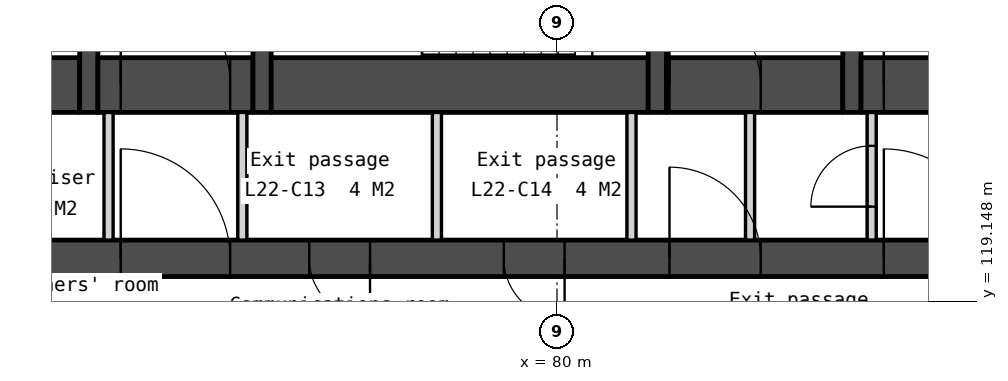
"""IFC4 building model, lengths in metres.
Left out: names, types, materials, properties, quantities, classifications, styles, units other than length and angle.
Written with IfcOpenShell. Run it as: python <this file> out.ifc"""

import sys

from ifc_helpers import new_model, si_unit, direction, frame, frame_2d, origin, place, context, subcontext, project, spatial, polyline, rectangle, outline, extrude, element, fill, save


model = new_model("IFC4")
c1 = context("Model", 3, precision=1e-05, world=origin(), true_north=direction((0.0, 1.0)))
c2 = subcontext(c1, "Body", "Model", "MODEL_VIEW")
j1 = project(units=[si_unit("LENGTHUNIT", "METRE"), si_unit("PLANEANGLEUNIT", "RADIAN")], contexts=[c1])
p1 = place(None, origin())
s1 = spatial("IfcSite", under=j1, at=p1, CompositionType="ELEMENT")
p2 = place(p1, origin())
s2 = spatial("IfcBuilding", under=s1, at=p2, CompositionType="ELEMENT")
p3 = place(p2, frame((0.0, 0.0, 92.3)))
s3 = spatial("IfcBuildingStorey", under=s2, at=p3, CompositionType="ELEMENT", Elevation=92.3)
p4 = place(p3, frame((66.0, 119.85, 0.0), z_axis=(0.0, 0.0, 1.0), x_axis=(1.0, 0.0, 0.0)))
e1 = element("IfcWall", 1, at=p4, inside=s3, PredefinedType="SOLIDWALL", context=c2, shape_type="SweptSolid", body=[
    extrude(rectangle(XDim=28.0, YDim=0.6, at=frame_2d((14.0, 0.0))), origin(), (0.0, 0.0, 1.0), 3.35),
])
p5 = place(p4, frame((6.825, 0.0, 0.0)))
e2 = element("IfcOpeningElement", 2, at=p5, cuts=e1, PredefinedType="OPENING", context=c2, shape_type="SweptSolid", body=[
    extrude(rectangle(XDim=1.8, YDim=2.1, at=frame_2d((0.9, 1.05))), frame((0.0, 0.31, 0.0), z_axis=(0.0, -1.0, 0.0), x_axis=(1.0, 0.0, 0.0)), (0.0, 0.0, 1.0), 0.62),
])
p6 = place(p4, frame((15.85, 0.0, 0.0)))
e3 = element("IfcOpeningElement", 3, at=p6, cuts=e1, PredefinedType="OPENING", context=c2, shape_type="SweptSolid", body=[
    extrude(rectangle(XDim=1.5, YDim=2.1, at=frame_2d((0.75, 1.05))), frame((0.0, 0.31, 0.0), z_axis=(0.0, -1.0, 0.0), x_axis=(1.0, 0.0, 0.0)), (0.0, 0.0, 1.0), 0.62),
])
p7 = place(p4, frame((19.375, 0.0, 0.0)))
e4 = element("IfcOpeningElement", 4, at=p7, cuts=e1, PredefinedType="OPENING", context=c2, shape_type="SweptSolid", body=[
    extrude(rectangle(XDim=1.8, YDim=2.1, at=frame_2d((0.9, 1.05))), frame((0.0, 0.31, 0.0), z_axis=(0.0, -1.0, 0.0), x_axis=(1.0, 0.0, 0.0)), (0.0, 0.0, 1.0), 0.62),
])
p8 = place(p4, frame((4.425, 0.0, 0.0)))
e5 = element("IfcOpeningElement", 5, at=p8, cuts=e1, PredefinedType="OPENING", context=c2, shape_type="SweptSolid", body=[
    extrude(rectangle(XDim=1.0, YDim=2.1, at=frame_2d((0.5, 1.05))), frame((0.0, 0.31, 0.0), z_axis=(0.0, -1.0, 0.0), x_axis=(1.0, 0.0, 0.0)), (0.0, 0.0, 1.0), 0.62),
])
p9 = place(p4, frame((9.925, 0.0, 0.0)))
e6 = element("IfcOpeningElement", 6, at=p9, cuts=e1, PredefinedType="OPENING", context=c2, shape_type="SweptSolid", body=[
    extrude(rectangle(XDim=1.0, YDim=2.1, at=frame_2d((0.5, 1.05))), frame((0.0, 0.31, 0.0), z_axis=(0.0, -1.0, 0.0), x_axis=(1.0, 0.0, 0.0)), (0.0, 0.0, 1.0), 0.62),
])
p10 = place(p4, frame((13.125, 0.0, 0.0)))
e7 = element("IfcOpeningElement", 7, at=p10, cuts=e1, PredefinedType="OPENING", context=c2, shape_type="SweptSolid", body=[
    extrude(rectangle(XDim=1.0, YDim=2.1, at=frame_2d((0.5, 1.05))), frame((0.0, 0.31, 0.0), z_axis=(0.0, -1.0, 0.0), x_axis=(1.0, 0.0, 0.0)), (0.0, 0.0, 1.0), 0.62),
])
p11 = place(p4, frame((21.725, 0.0, 0.0)))
e8 = element("IfcOpeningElement", 8, at=p11, cuts=e1, PredefinedType="OPENING", context=c2, shape_type="SweptSolid", body=[
    extrude(rectangle(XDim=1.0, YDim=2.1, at=frame_2d((0.5, 1.05))), frame((0.0, 0.31, 0.0), z_axis=(0.0, -1.0, 0.0), x_axis=(1.0, 0.0, 0.0)), (0.0, 0.0, 1.0), 0.62),
])
p12 = place(p4, frame((23.425, 0.0, 0.0)))
e9 = element("IfcOpeningElement", 9, at=p12, cuts=e1, PredefinedType="OPENING", context=c2, shape_type="SweptSolid", body=[
    extrude(rectangle(XDim=1.0, YDim=2.1, at=frame_2d((0.5, 1.05))), frame((0.0, 0.31, 0.0), z_axis=(0.0, -1.0, 0.0), x_axis=(1.0, 0.0, 0.0)), (0.0, 0.0, 1.0), 0.62),
])
p13 = place(p3, frame((69.6, 122.7, 0.0), z_axis=(0.0, 0.0, 1.0), x_axis=(1.0, 0.0, 0.0)))
e10 = element("IfcWall", 10, at=p13, inside=s3, PredefinedType="SOLIDWALL", context=c2, shape_type="SweptSolid", body=[
    extrude(rectangle(XDim=2.55, YDim=0.9, at=frame_2d((1.275, 0.0))), origin(), (0.0, 0.0, 1.0), 3.35),
])
p14 = place(p3, frame((72.3, 133.95, 0.0), z_axis=(0.0, 0.0, 1.0), x_axis=(0.0, -1.0, 0.0)))
e11 = element("IfcWall", 11, at=p14, inside=s3, PredefinedType="SOLIDWALL", context=c2, shape_type="SweptSolid", body=[
    extrude(rectangle(XDim=11.7, YDim=0.3, at=frame_2d((5.85, 0.0))), origin(), (0.0, 0.0, 1.0), 3.35),
])
p15 = place(p14, frame((6.95, 0.0, 0.0)))
e12 = element("IfcOpeningElement", 12, at=p15, cuts=e11, PredefinedType="OPENING", context=c2, shape_type="SweptSolid", body=[
    extrude(rectangle(XDim=1.1, YDim=2.1, at=frame_2d((0.55, 1.05))), frame((0.0, 0.16, 0.0), z_axis=(0.0, -1.0, 0.0), x_axis=(1.0, 0.0, 0.0)), (0.0, 0.0, 1.0), 0.32),
])
p16 = place(p14, frame((9.35, 0.0, 0.0)))
e13 = element("IfcOpeningElement", 13, at=p16, cuts=e11, PredefinedType="OPENING", context=c2, shape_type="SweptSolid", body=[
    extrude(rectangle(XDim=0.9, YDim=2.1, at=frame_2d((0.45, 1.05))), frame((0.0, 0.16, 0.0), z_axis=(0.0, -1.0, 0.0), x_axis=(1.0, 0.0, 0.0)), (0.0, 0.0, 1.0), 0.32),
])
p17 = place(p14, frame((5.1, 0.0, 0.0)))
e14 = element("IfcOpeningElement", 14, at=p17, cuts=e11, PredefinedType="OPENING", context=c2, shape_type="SweptSolid", body=[
    extrude(rectangle(XDim=1.0, YDim=2.1, at=frame_2d((0.5, 1.05))), frame((0.0, 0.16, 0.0), z_axis=(0.0, -1.0, 0.0), x_axis=(1.0, 0.0, 0.0)), (0.0, 0.0, 1.0), 0.32),
])
p18 = place(p3, frame((72.45, 122.7, 0.0), z_axis=(0.0, 0.0, 1.0), x_axis=(1.0, 0.0, 0.0)))
e15 = element("IfcWall", 15, at=p18, inside=s3, PredefinedType="SOLIDWALL", context=c2, shape_type="SweptSolid", body=[
    extrude(rectangle(XDim=2.55, YDim=0.9, at=frame_2d((1.275, 0.0))), origin(), (0.0, 0.0, 1.0), 3.35),
])
p19 = place(p18, frame((0.375, 0.0, 0.0)))
e16 = element("IfcOpeningElement", 16, at=p19, cuts=e15, PredefinedType="OPENING", context=c2, shape_type="SweptSolid", body=[
    extrude(rectangle(XDim=1.8, YDim=2.1, at=frame_2d((0.9, 1.05))), frame((0.0, 0.46, 0.0), z_axis=(0.0, -1.0, 0.0), x_axis=(1.0, 0.0, 0.0)), (0.0, 0.0, 1.0), 0.92),
])
for number, where, z_axis, x_axis in (
    (17, (72.625, 122.25, 0.0), (0.0, 0.0, 1.0), (0.0, -1.0, 0.0)),
    (18, (74.825, 122.25, 0.0), (0.0, 0.0, 1.0), (0.0, -1.0, 0.0)),
):
    element("IfcWall", number, at=place(p3, frame(where, z_axis=z_axis, x_axis=x_axis)), inside=s3, PredefinedType="PARTITIONING", context=c2, shape_type="SweptSolid", body=[
        extrude(rectangle(XDim=2.1, YDim=0.15, at=frame_2d((1.05, 0.0))), origin(), (0.0, 0.0, 1.0), 3.35),
    ])
p20 = place(p3, frame((75.15, 133.95, 0.0), z_axis=(0.0, 0.0, 1.0), x_axis=(0.0, -1.0, 0.0)))
e19 = element("IfcWall", 19, at=p20, inside=s3, PredefinedType="SOLIDWALL", context=c2, shape_type="SweptSolid", body=[
    extrude(rectangle(XDim=11.7, YDim=0.3, at=frame_2d((5.85, 0.0))), origin(), (0.0, 0.0, 1.0), 3.35),
])
p21 = place(p3, frame((75.3, 122.7, 0.0), z_axis=(0.0, 0.0, 1.0), x_axis=(1.0, 0.0, 0.0)))
e20 = element("IfcWall", 20, at=p21, inside=s3, PredefinedType="SOLIDWALL", context=c2, shape_type="SweptSolid", body=[
    extrude(rectangle(XDim=6.2, YDim=0.9, at=frame_2d((3.1, 0.0))), origin(), (0.0, 0.0, 1.0), 3.35),
])
for number, where, z_axis, x_axis in (
    (21, (78.025, 122.25, 0.0), (0.0, 0.0, 1.0), (0.0, -1.0, 0.0)),
    (22, (81.225, 122.25, 0.0), (0.0, 0.0, 1.0), (0.0, -1.0, 0.0)),
):
    element("IfcWall", number, at=place(p3, frame(where, z_axis=z_axis, x_axis=x_axis)), inside=s3, PredefinedType="PARTITIONING", context=c2, shape_type="SweptSolid", body=[
        extrude(rectangle(XDim=2.1, YDim=0.15, at=frame_2d((1.05, 0.0))), origin(), (0.0, 0.0, 1.0), 3.35),
    ])
p22 = place(p3, frame((81.65, 125.7, 0.0), z_axis=(0.0, 0.0, 1.0), x_axis=(0.0, -1.0, 0.0)))
e23 = element("IfcWall", 23, at=p22, inside=s3, PredefinedType="SOLIDWALL", context=c2, shape_type="SweptSolid", body=[
    extrude(rectangle(XDim=3.45, YDim=0.3, at=frame_2d((1.725, 0.0))), origin(), (0.0, 0.0, 1.0), 3.35),
])
p23 = place(p22, frame((0.75, 0.0, 0.0)))
e24 = element("IfcOpeningElement", 24, at=p23, cuts=e23, PredefinedType="OPENING", context=c2, shape_type="SweptSolid", body=[
    extrude(rectangle(XDim=1.0, YDim=2.1, at=frame_2d((0.5, 1.05))), frame((0.0, 0.16, 0.0), z_axis=(0.0, -1.0, 0.0), x_axis=(1.0, 0.0, 0.0)), (0.0, 0.0, 1.0), 0.32),
])
p24 = place(p3, frame((81.8, 122.7, 0.0), z_axis=(0.0, 0.0, 1.0), x_axis=(1.0, 0.0, 0.0)))
e25 = element("IfcWall", 25, at=p24, inside=s3, PredefinedType="SOLIDWALL", context=c2, shape_type="SweptSolid", body=[
    extrude(rectangle(XDim=2.9, YDim=0.9, at=frame_2d((1.45, 0.0))), origin(), (0.0, 0.0, 1.0), 3.35),
])
p25 = place(p24, frame((0.05, 0.0, 0.0)))
e26 = element("IfcOpeningElement", 26, at=p25, cuts=e25, PredefinedType="OPENING", context=c2, shape_type="SweptSolid", body=[
    extrude(rectangle(XDim=1.5, YDim=2.1, at=frame_2d((0.75, 1.05))), frame((0.0, 0.46, 0.0), z_axis=(0.0, -1.0, 0.0), x_axis=(1.0, 0.0, 0.0)), (0.0, 0.0, 1.0), 0.92),
])
p26 = place(p3, frame((83.175, 122.25, 0.0), z_axis=(0.0, 0.0, 1.0), x_axis=(0.0, -1.0, 0.0)))
e27 = element("IfcWall", 27, at=p26, inside=s3, PredefinedType="PARTITIONING", context=c2, shape_type="SweptSolid", body=[
    extrude(rectangle(XDim=2.1, YDim=0.15, at=frame_2d((1.05, 0.0))), origin(), (0.0, 0.0, 1.0), 3.35),
])
p27 = place(p3, frame((84.85, 133.95, 0.0), z_axis=(0.0, 0.0, 1.0), x_axis=(0.0, -1.0, 0.0)))
e28 = element("IfcWall", 28, at=p27, inside=s3, PredefinedType="SOLIDWALL", context=c2, shape_type="SweptSolid", body=[
    extrude(rectangle(XDim=11.7, YDim=0.3, at=frame_2d((5.85, 0.0))), origin(), (0.0, 0.0, 1.0), 3.35),
])
p28 = place(p3, frame((85.0, 122.7, 0.0), z_axis=(0.0, 0.0, 1.0), x_axis=(1.0, 0.0, 0.0)))
e29 = element("IfcWall", 29, at=p28, inside=s3, PredefinedType="SOLIDWALL", context=c2, shape_type="SweptSolid", body=[
    extrude(rectangle(XDim=2.55, YDim=0.9, at=frame_2d((1.275, 0.0))), origin(), (0.0, 0.0, 1.0), 3.35),
])
p29 = place(p28, frame((0.375, 0.0, 0.0)))
e30 = element("IfcOpeningElement", 30, at=p29, cuts=e29, PredefinedType="OPENING", context=c2, shape_type="SweptSolid", body=[
    extrude(rectangle(XDim=1.8, YDim=2.1, at=frame_2d((0.9, 1.05))), frame((0.0, 0.46, 0.0), z_axis=(0.0, -1.0, 0.0), x_axis=(1.0, 0.0, 0.0)), (0.0, 0.0, 1.0), 0.92),
])
p30 = place(p3, frame((85.175, 122.25, 0.0), z_axis=(0.0, 0.0, 1.0), x_axis=(0.0, -1.0, 0.0)))
e31 = element("IfcWall", 31, at=p30, inside=s3, PredefinedType="PARTITIONING", context=c2, shape_type="SweptSolid", body=[
    extrude(rectangle(XDim=2.1, YDim=0.15, at=frame_2d((1.05, 0.0))), origin(), (0.0, 0.0, 1.0), 3.35),
])
p31 = place(p30, frame((0.55, 0.0, 0.0)))
e32 = element("IfcOpeningElement", 32, at=p31, cuts=e31, PredefinedType="OPENING", context=c2, shape_type="SweptSolid", body=[
    extrude(rectangle(XDim=1.0, YDim=2.1, at=frame_2d((0.5, 1.05))), frame((0.0, 0.085, 0.0), z_axis=(0.0, -1.0, 0.0), x_axis=(1.0, 0.0, 0.0)), (0.0, 0.0, 1.0), 0.17),
])
p32 = place(p3, frame((56.073, 130.263, -0.15), z_axis=(0.0, 0.0, 1.0), x_axis=(0.500000478905, -0.866025127289, 0.0)))
e33 = element("IfcWall", 33, at=p32, inside=s3, PredefinedType="SOLIDWALL", context=c2, shape_type="SweptSolid", body=[
    extrude(outline(polyline([(42.643, 0.0), (42.643, 3.5), (0.0, 3.5), (0.0, 0.0), (42.643, 0.0)])), frame((0.0, 0.225, 0.0), z_axis=(0.0, -1.0, 0.0), x_axis=(1.0, 0.0, 0.0)), (0.0, 0.0, 1.0), 0.45),
])
p33 = place(p32, frame((2.814, 0.0, 1.05)))
e34 = element("IfcOpeningElement", 34, at=p33, cuts=e33, PredefinedType="OPENING", context=c2, shape_type="SweptSolid", body=[
    extrude(rectangle(XDim=1.2, YDim=1.5, at=frame_2d((0.6, 0.75))), frame((0.0, 0.235, 0.0), z_axis=(0.0, -1.0, 0.0), x_axis=(1.0, 0.0, 0.0)), (0.0, 0.0, 1.0), 0.47),
])
p34 = place(p32, frame((4.514, 0.0, 1.05)))
e35 = element("IfcOpeningElement", 35, at=p34, cuts=e33, PredefinedType="OPENING", context=c2, shape_type="SweptSolid", body=[
    extrude(rectangle(XDim=1.2, YDim=1.5, at=frame_2d((0.6, 0.75))), frame((0.0, 0.235, 0.0), z_axis=(0.0, -1.0, 0.0), x_axis=(1.0, 0.0, 0.0)), (0.0, 0.0, 1.0), 0.47),
])
p35 = place(p32, frame((11.343, 0.0, 1.05)))
e36 = element("IfcOpeningElement", 36, at=p35, cuts=e33, PredefinedType="OPENING", context=c2, shape_type="SweptSolid", body=[
    extrude(rectangle(XDim=1.2, YDim=1.5, at=frame_2d((0.6, 0.75))), frame((0.0, 0.235, 0.0), z_axis=(0.0, -1.0, 0.0), x_axis=(1.0, 0.0, 0.0)), (0.0, 0.0, 1.0), 0.47),
])
p36 = place(p32, frame((13.043, 0.0, 1.05)))
e37 = element("IfcOpeningElement", 37, at=p36, cuts=e33, PredefinedType="OPENING", context=c2, shape_type="SweptSolid", body=[
    extrude(rectangle(XDim=1.2, YDim=1.5, at=frame_2d((0.6, 0.75))), frame((0.0, 0.235, 0.0), z_axis=(0.0, -1.0, 0.0), x_axis=(1.0, 0.0, 0.0)), (0.0, 0.0, 1.0), 0.47),
])
p37 = place(p32, frame((19.872, 0.0, 1.05)))
e38 = element("IfcOpeningElement", 38, at=p37, cuts=e33, PredefinedType="OPENING", context=c2, shape_type="SweptSolid", body=[
    extrude(rectangle(XDim=1.2, YDim=1.5, at=frame_2d((0.6, 0.75))), frame((0.0, 0.235, 0.0), z_axis=(0.0, -1.0, 0.0), x_axis=(1.0, 0.0, 0.0)), (0.0, 0.0, 1.0), 0.47),
])
p38 = place(p32, frame((21.572, 0.0, 1.05)))
e39 = element("IfcOpeningElement", 39, at=p38, cuts=e33, PredefinedType="OPENING", context=c2, shape_type="SweptSolid", body=[
    extrude(rectangle(XDim=1.2, YDim=1.5, at=frame_2d((0.6, 0.75))), frame((0.0, 0.235, 0.0), z_axis=(0.0, -1.0, 0.0), x_axis=(1.0, 0.0, 0.0)), (0.0, 0.0, 1.0), 0.47),
])
p39 = place(p32, frame((28.4, 0.0, 1.05)))
e40 = element("IfcOpeningElement", 40, at=p39, cuts=e33, PredefinedType="OPENING", context=c2, shape_type="SweptSolid", body=[
    extrude(rectangle(XDim=1.2, YDim=1.5, at=frame_2d((0.6, 0.75))), frame((0.0, 0.235, 0.0), z_axis=(0.0, -1.0, 0.0), x_axis=(1.0, 0.0, 0.0)), (0.0, 0.0, 1.0), 0.47),
])
p40 = place(p32, frame((30.1, 0.0, 1.05)))
e41 = element("IfcOpeningElement", 41, at=p40, cuts=e33, PredefinedType="OPENING", context=c2, shape_type="SweptSolid", body=[
    extrude(rectangle(XDim=1.2, YDim=1.5, at=frame_2d((0.6, 0.75))), frame((0.0, 0.235, 0.0), z_axis=(0.0, -1.0, 0.0), x_axis=(1.0, 0.0, 0.0)), (0.0, 0.0, 1.0), 0.47),
])
p41 = place(p32, frame((36.929, 0.0, 1.05)))
e42 = element("IfcOpeningElement", 42, at=p41, cuts=e33, PredefinedType="OPENING", context=c2, shape_type="SweptSolid", body=[
    extrude(rectangle(XDim=1.2, YDim=1.5, at=frame_2d((0.6, 0.75))), frame((0.0, 0.235, 0.0), z_axis=(0.0, -1.0, 0.0), x_axis=(1.0, 0.0, 0.0)), (0.0, 0.0, 1.0), 0.47),
])
p42 = place(p32, frame((38.629, 0.0, 1.05)))
e43 = element("IfcOpeningElement", 43, at=p42, cuts=e33, PredefinedType="OPENING", context=c2, shape_type="SweptSolid", body=[
    extrude(rectangle(XDim=1.2, YDim=1.5, at=frame_2d((0.6, 0.75))), frame((0.0, 0.235, 0.0), z_axis=(0.0, -1.0, 0.0), x_axis=(1.0, 0.0, 0.0)), (0.0, 0.0, 1.0), 0.47),
])
p43 = place(p3, frame((82.605, 93.333, -0.15), z_axis=(0.0, 0.0, 1.0), x_axis=(0.500000478905, 0.866025127289, 0.0)))
e44 = element("IfcWall", 44, at=p43, inside=s3, PredefinedType="SOLIDWALL", context=c2, shape_type="SweptSolid", body=[
    extrude(outline(polyline([(42.643, 0.0), (42.643, 3.5), (0.0, 3.5), (0.0, 0.0), (42.643, 0.0)])), frame((0.0, 0.225, 0.0), z_axis=(0.0, -1.0, 0.0), x_axis=(1.0, 0.0, 0.0)), (0.0, 0.0, 1.0), 0.45),
])
p44 = place(p43, frame((2.814, 0.0, 1.05)))
e45 = element("IfcOpeningElement", 45, at=p44, cuts=e44, PredefinedType="OPENING", context=c2, shape_type="SweptSolid", body=[
    extrude(rectangle(XDim=1.2, YDim=1.5, at=frame_2d((0.6, 0.75))), frame((0.0, 0.235, 0.0), z_axis=(0.0, -1.0, 0.0), x_axis=(1.0, 0.0, 0.0)), (0.0, 0.0, 1.0), 0.47),
])
p45 = place(p43, frame((4.514, 0.0, 1.05)))
e46 = element("IfcOpeningElement", 46, at=p45, cuts=e44, PredefinedType="OPENING", context=c2, shape_type="SweptSolid", body=[
    extrude(rectangle(XDim=1.2, YDim=1.5, at=frame_2d((0.6, 0.75))), frame((0.0, 0.235, 0.0), z_axis=(0.0, -1.0, 0.0), x_axis=(1.0, 0.0, 0.0)), (0.0, 0.0, 1.0), 0.47),
])
p46 = place(p43, frame((11.343, 0.0, 1.05)))
e47 = element("IfcOpeningElement", 47, at=p46, cuts=e44, PredefinedType="OPENING", context=c2, shape_type="SweptSolid", body=[
    extrude(rectangle(XDim=1.2, YDim=1.5, at=frame_2d((0.6, 0.75))), frame((0.0, 0.235, 0.0), z_axis=(0.0, -1.0, 0.0), x_axis=(1.0, 0.0, 0.0)), (0.0, 0.0, 1.0), 0.47),
])
p47 = place(p43, frame((13.043, 0.0, 1.05)))
e48 = element("IfcOpeningElement", 48, at=p47, cuts=e44, PredefinedType="OPENING", context=c2, shape_type="SweptSolid", body=[
    extrude(rectangle(XDim=1.2, YDim=1.5, at=frame_2d((0.6, 0.75))), frame((0.0, 0.235, 0.0), z_axis=(0.0, -1.0, 0.0), x_axis=(1.0, 0.0, 0.0)), (0.0, 0.0, 1.0), 0.47),
])
p48 = place(p43, frame((19.872, 0.0, 1.05)))
e49 = element("IfcOpeningElement", 49, at=p48, cuts=e44, PredefinedType="OPENING", context=c2, shape_type="SweptSolid", body=[
    extrude(rectangle(XDim=1.2, YDim=1.5, at=frame_2d((0.6, 0.75))), frame((0.0, 0.235, 0.0), z_axis=(0.0, -1.0, 0.0), x_axis=(1.0, 0.0, 0.0)), (0.0, 0.0, 1.0), 0.47),
])
p49 = place(p43, frame((21.572, 0.0, 1.05)))
e50 = element("IfcOpeningElement", 50, at=p49, cuts=e44, PredefinedType="OPENING", context=c2, shape_type="SweptSolid", body=[
    extrude(rectangle(XDim=1.2, YDim=1.5, at=frame_2d((0.6, 0.75))), frame((0.0, 0.235, 0.0), z_axis=(0.0, -1.0, 0.0), x_axis=(1.0, 0.0, 0.0)), (0.0, 0.0, 1.0), 0.47),
])
p50 = place(p43, frame((28.4, 0.0, 1.05)))
e51 = element("IfcOpeningElement", 51, at=p50, cuts=e44, PredefinedType="OPENING", context=c2, shape_type="SweptSolid", body=[
    extrude(rectangle(XDim=1.2, YDim=1.5, at=frame_2d((0.6, 0.75))), frame((0.0, 0.235, 0.0), z_axis=(0.0, -1.0, 0.0), x_axis=(1.0, 0.0, 0.0)), (0.0, 0.0, 1.0), 0.47),
])
p51 = place(p43, frame((30.1, 0.0, 1.05)))
e52 = element("IfcOpeningElement", 52, at=p51, cuts=e44, PredefinedType="OPENING", context=c2, shape_type="SweptSolid", body=[
    extrude(rectangle(XDim=1.2, YDim=1.5, at=frame_2d((0.6, 0.75))), frame((0.0, 0.235, 0.0), z_axis=(0.0, -1.0, 0.0), x_axis=(1.0, 0.0, 0.0)), (0.0, 0.0, 1.0), 0.47),
])
p52 = place(p43, frame((36.929, 0.0, 1.05)))
e53 = element("IfcOpeningElement", 53, at=p52, cuts=e44, PredefinedType="OPENING", context=c2, shape_type="SweptSolid", body=[
    extrude(rectangle(XDim=1.2, YDim=1.5, at=frame_2d((0.6, 0.75))), frame((0.0, 0.235, 0.0), z_axis=(0.0, -1.0, 0.0), x_axis=(1.0, 0.0, 0.0)), (0.0, 0.0, 1.0), 0.47),
])
p53 = place(p43, frame((38.629, 0.0, 1.05)))
e54 = element("IfcOpeningElement", 54, at=p53, cuts=e44, PredefinedType="OPENING", context=c2, shape_type="SweptSolid", body=[
    extrude(rectangle(XDim=1.2, YDim=1.5, at=frame_2d((0.6, 0.75))), frame((0.0, 0.235, 0.0), z_axis=(0.0, -1.0, 0.0), x_axis=(1.0, 0.0, 0.0)), (0.0, 0.0, 1.0), 0.47),
])
p54 = place(p29, origin())
e55 = element("IfcDoor", 55, at=p54, inside=s3, OperationType="DOUBLE_DOOR_DOUBLE_SWING", PredefinedType="DOOR", context=c2, shape_type="SweptSolid", body=[
    extrude(rectangle(XDim=1.8, YDim=2.1, at=frame_2d((0.9, 1.05))), frame((0.0, 0.025, 0.0), z_axis=(0.0, -1.0, 0.0), x_axis=(1.0, 0.0, 0.0)), (0.0, 0.0, 1.0), 0.05),
])
fill(e30, e55)
p55 = place(p19, origin())
e56 = element("IfcDoor", 56, at=p55, inside=s3, OperationType="DOUBLE_DOOR_DOUBLE_SWING", PredefinedType="DOOR", context=c2, shape_type="SweptSolid", body=[
    extrude(rectangle(XDim=1.8, YDim=2.1, at=frame_2d((0.9, 1.05))), frame((0.0, 0.025, 0.0), z_axis=(0.0, -1.0, 0.0), x_axis=(1.0, 0.0, 0.0)), (0.0, 0.0, 1.0), 0.05),
])
fill(e16, e56)
p56 = place(p25, origin())
e57 = element("IfcDoor", 57, at=p56, inside=s3, OperationType="DOUBLE_DOOR_DOUBLE_SWING", PredefinedType="DOOR", context=c2, shape_type="SweptSolid", body=[
    extrude(rectangle(XDim=1.5, YDim=2.1, at=frame_2d((0.75, 1.05))), frame((0.0, 0.025, 0.0), z_axis=(0.0, -1.0, 0.0), x_axis=(1.0, 0.0, 0.0)), (0.0, 0.0, 1.0), 0.05),
])
fill(e26, e57)
p57 = place(p5, origin())
e58 = element("IfcDoor", 58, at=p57, inside=s3, OperationType="DOUBLE_DOOR_DOUBLE_SWING", PredefinedType="DOOR", context=c2, shape_type="SweptSolid", body=[
    extrude(rectangle(XDim=1.8, YDim=2.1, at=frame_2d((0.9, 1.05))), frame((0.0, 0.025, 0.0), z_axis=(0.0, -1.0, 0.0), x_axis=(1.0, 0.0, 0.0)), (0.0, 0.0, 1.0), 0.05),
])
fill(e2, e58)
p58 = place(p6, origin())
e59 = element("IfcDoor", 59, at=p58, inside=s3, OperationType="DOUBLE_DOOR_DOUBLE_SWING", PredefinedType="DOOR", context=c2, shape_type="SweptSolid", body=[
    extrude(rectangle(XDim=1.5, YDim=2.1, at=frame_2d((0.75, 1.05))), frame((0.0, 0.025, 0.0), z_axis=(0.0, -1.0, 0.0), x_axis=(1.0, 0.0, 0.0)), (0.0, 0.0, 1.0), 0.05),
])
fill(e3, e59)
p59 = place(p7, origin())
e60 = element("IfcDoor", 60, at=p59, inside=s3, OperationType="DOUBLE_DOOR_DOUBLE_SWING", PredefinedType="DOOR", context=c2, shape_type="SweptSolid", body=[
    extrude(rectangle(XDim=1.8, YDim=2.1, at=frame_2d((0.9, 1.05))), frame((0.0, 0.025, 0.0), z_axis=(0.0, -1.0, 0.0), x_axis=(1.0, 0.0, 0.0)), (0.0, 0.0, 1.0), 0.05),
])
fill(e4, e60)
p60 = place(p9, origin())
e61 = element("IfcDoor", 61, at=p60, inside=s3, OperationType="SINGLE_SWING_RIGHT", PredefinedType="DOOR", context=c2, shape_type="SweptSolid", body=[
    extrude(rectangle(XDim=1.0, YDim=2.1, at=frame_2d((0.5, 1.05))), frame((0.0, 0.025, 0.0), z_axis=(0.0, -1.0, 0.0), x_axis=(1.0, 0.0, 0.0)), (0.0, 0.0, 1.0), 0.05),
])
fill(e6, e61)
p61 = place(p10, origin())
e62 = element("IfcDoor", 62, at=p61, inside=s3, OperationType="SINGLE_SWING_RIGHT", PredefinedType="DOOR", context=c2, shape_type="SweptSolid", body=[
    extrude(rectangle(XDim=1.0, YDim=2.1, at=frame_2d((0.5, 1.05))), frame((0.0, 0.025, 0.0), z_axis=(0.0, -1.0, 0.0), x_axis=(1.0, 0.0, 0.0)), (0.0, 0.0, 1.0), 0.05),
])
fill(e7, e62)
p62 = place(p31, origin())
e63 = element("IfcDoor", 63, at=p62, inside=s3, OperationType="SINGLE_SWING_RIGHT", PredefinedType="DOOR", context=c2, shape_type="SweptSolid", body=[
    extrude(rectangle(XDim=1.0, YDim=2.1, at=frame_2d((0.5, 1.05))), frame((0.0, 0.025, 0.0), z_axis=(0.0, -1.0, 0.0), x_axis=(1.0, 0.0, 0.0)), (0.0, 0.0, 1.0), 0.05),
])
fill(e32, e63)
save(model, sys.argv[1])
